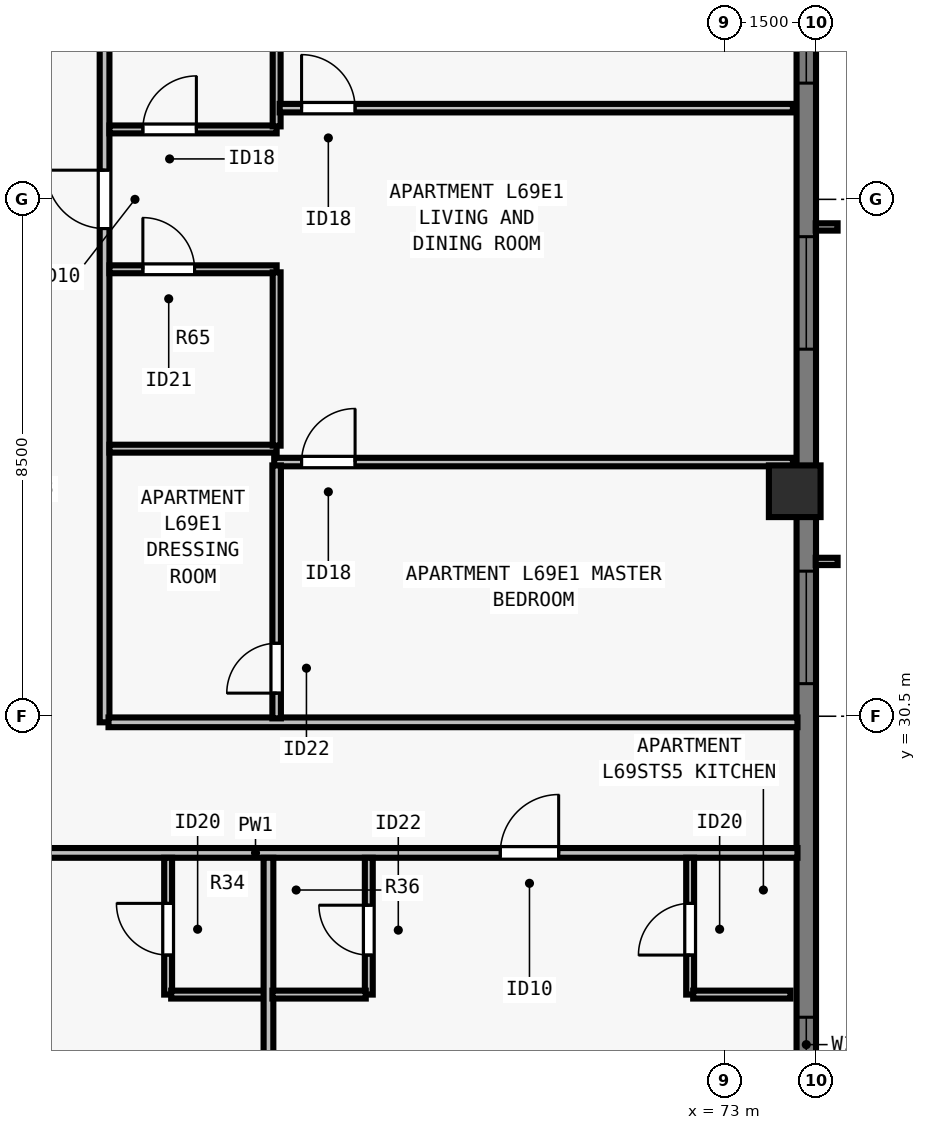
"""IFC4 building model, lengths in metres.
Left out: names, types, materials, properties, quantities, classifications, styles, units other than length and angle.
Written with IfcOpenShell. Run it as: python <this file> out.ifc"""

import sys

from ifc_helpers import new_model, si_unit, direction, frame, frame_2d, origin, origin_2d, place, context, subcontext, project, spatial, rectangle, extrude, element, fill, save


model = new_model("IFC4")
c1 = context("Model", 3, precision=1e-05, world=origin(), true_north=direction((0.0, 1.0)))
c2 = subcontext(c1, "Body", "Model", "MODEL_VIEW")
j1 = project(units=[si_unit("LENGTHUNIT", "METRE"), si_unit("PLANEANGLEUNIT", "RADIAN")], contexts=[c1])
p1 = place(None, origin())
s1 = spatial("IfcSite", under=j1, at=p1, CompositionType="ELEMENT")
p2 = place(p1, origin())
s2 = spatial("IfcBuilding", under=s1, at=p2, CompositionType="ELEMENT")
p3 = place(p2, frame((0.0, 0.0, 251.5)))
s3 = spatial("IfcBuildingStorey", under=s2, at=p3, CompositionType="ELEMENT", Elevation=251.5)
p4 = place(p3, frame((74.15, 34.2, 0.0), z_axis=(0.0, 0.0, 1.0), x_axis=(0.0, 1.0, 0.0)))
e1 = element("IfcColumn", 1, at=p4, inside=s3, PredefinedType="COLUMN", context=c2, shape_type="SweptSolid", body=[
    extrude(rectangle(XDim=0.85, YDim=0.85, at=origin_2d()), origin(), (0.0, 0.0, 1.0), 3.5),
])
p5 = place(p3, frame((74.34, 56.5, 0.0), z_axis=(0.0, 0.0, 1.0), x_axis=(0.0, -1.0, 0.0)))
e2 = element("IfcWall", 2, at=p5, inside=s3, PredefinedType="SOLIDWALL", context=c2, shape_type="SweptSolid", body=[
    extrude(rectangle(XDim=34.702, YDim=0.32, at=frame_2d((17.351, 0.0))), origin(), (0.0, 0.0, 1.0), 3.29),
])
p6 = place(p5, frame((9.388, 0.0, 0.8)))
e3 = element("IfcOpeningElement", 3, at=p6, cuts=e2, PredefinedType="OPENING", context=c2, shape_type="SweptSolid", body=[
    extrude(rectangle(XDim=1.55, YDim=1.678, at=frame_2d((0.775, 0.839))), frame((0.0, 0.17, 0.0), z_axis=(0.0, -1.0, 0.0), x_axis=(1.0, 0.0, 0.0)), (0.0, 0.0, 1.0), 0.34),
])
p7 = place(p5, frame((14.038, 0.0, 0.8)))
e4 = element("IfcOpeningElement", 4, at=p7, cuts=e2, PredefinedType="OPENING", context=c2, shape_type="SweptSolid", body=[
    extrude(rectangle(XDim=1.55, YDim=1.678, at=frame_2d((0.775, 0.839))), frame((0.0, 0.17, 0.0), z_axis=(0.0, -1.0, 0.0), x_axis=(1.0, 0.0, 0.0)), (0.0, 0.0, 1.0), 0.34),
])
p8 = place(p5, frame((18.114, 0.0, 0.8)))
e5 = element("IfcOpeningElement", 5, at=p8, cuts=e2, PredefinedType="OPENING", context=c2, shape_type="SweptSolid", body=[
    extrude(rectangle(XDim=1.85, YDim=1.678, at=frame_2d((0.925, 0.839))), frame((0.0, 0.17, 0.0), z_axis=(0.0, -1.0, 0.0), x_axis=(1.0, 0.0, 0.0)), (0.0, 0.0, 1.0), 0.34),
])
p9 = place(p5, frame((23.614, 0.0, 0.8)))
e6 = element("IfcOpeningElement", 6, at=p9, cuts=e2, PredefinedType="OPENING", context=c2, shape_type="SweptSolid", body=[
    extrude(rectangle(XDim=1.85, YDim=1.678, at=frame_2d((0.925, 0.839))), frame((0.0, 0.17, 0.0), z_axis=(0.0, -1.0, 0.0), x_axis=(1.0, 0.0, 0.0)), (0.0, 0.0, 1.0), 0.34),
])
p10 = place(p5, frame((30.95, 0.0, 0.8)))
e7 = element("IfcOpeningElement", 7, at=p10, cuts=e2, PredefinedType="OPENING", context=c2, shape_type="SweptSolid", body=[
    extrude(rectangle(XDim=0.9, YDim=1.678, at=frame_2d((0.45, 0.839))), frame((0.0, 0.17, 0.0), z_axis=(0.0, -1.0, 0.0), x_axis=(1.0, 0.0, 0.0)), (0.0, 0.0, 1.0), 0.34),
])
p11 = place(p3, frame((29.915, 28.252, 0.0), z_axis=(0.0, 0.0, 1.0), x_axis=(1.0, 0.0, 0.0)))
e8 = element("IfcWall", 8, at=p11, inside=s3, PredefinedType="PARTITIONING", context=c2, shape_type="SweptSolid", body=[
    extrude(rectangle(XDim=44.28, YDim=0.16, at=frame_2d((22.14, 0.0))), origin(), (0.0, 0.0, 1.0), 2.958),
])
p12 = place(p11, frame((5.002, 0.0, 0.0)))
e9 = element("IfcOpeningElement", 9, at=p12, cuts=e8, PredefinedType="OPENING", context=c2, shape_type="SweptSolid", body=[
    extrude(rectangle(XDim=0.96, YDim=2.18, at=frame_2d((0.48, 1.09))), frame((0.0, 0.09, 0.0), z_axis=(0.0, -1.0, 0.0), x_axis=(1.0, 0.0, 0.0)), (0.0, 0.0, 1.0), 0.18),
])
p13 = place(p11, frame((12.718, 0.0, 0.0)))
e10 = element("IfcOpeningElement", 10, at=p13, cuts=e8, PredefinedType="OPENING", context=c2, shape_type="SweptSolid", body=[
    extrude(rectangle(XDim=0.96, YDim=2.18, at=frame_2d((0.48, 1.09))), frame((0.0, 0.09, 0.0), z_axis=(0.0, -1.0, 0.0), x_axis=(1.0, 0.0, 0.0)), (0.0, 0.0, 1.0), 0.18),
])
p14 = place(p11, frame((21.55, 0.0, 0.0)))
e11 = element("IfcOpeningElement", 11, at=p14, cuts=e8, PredefinedType="OPENING", context=c2, shape_type="SweptSolid", body=[
    extrude(rectangle(XDim=0.96, YDim=2.18, at=frame_2d((0.48, 1.09))), frame((0.0, 0.09, 0.0), z_axis=(0.0, -1.0, 0.0), x_axis=(1.0, 0.0, 0.0)), (0.0, 0.0, 1.0), 0.18),
])
p15 = place(p11, frame((30.382, 0.0, 0.0)))
e12 = element("IfcOpeningElement", 12, at=p15, cuts=e8, PredefinedType="OPENING", context=c2, shape_type="SweptSolid", body=[
    extrude(rectangle(XDim=0.96, YDim=2.18, at=frame_2d((0.48, 1.09))), frame((0.0, 0.09, 0.0), z_axis=(0.0, -1.0, 0.0), x_axis=(1.0, 0.0, 0.0)), (0.0, 0.0, 1.0), 0.18),
])
p16 = place(p11, frame((39.393, 0.0, 0.0)))
e13 = element("IfcOpeningElement", 13, at=p16, cuts=e8, PredefinedType="OPENING", context=c2, shape_type="SweptSolid", body=[
    extrude(rectangle(XDim=0.96, YDim=2.18, at=frame_2d((0.48, 1.09))), frame((0.0, 0.09, 0.0), z_axis=(0.0, -1.0, 0.0), x_axis=(1.0, 0.0, 0.0)), (0.0, 0.0, 1.0), 0.18),
])
p17 = place(p3, frame((62.8, 30.4, 0.0), z_axis=(0.0, 0.0, 1.0), x_axis=(0.0, 1.0, 0.0)))
e14 = element("IfcWall", 14, at=p17, inside=s3, PredefinedType="PARTITIONING", context=c2, shape_type="SweptSolid", body=[
    extrude(rectangle(XDim=17.2, YDim=0.16, at=frame_2d((8.6, 0.0))), origin(), (0.0, 0.0, 1.0), 3.29),
])
p18 = place(p17, frame((8.12, 0.0, 0.0)))
e15 = element("IfcOpeningElement", 15, at=p18, cuts=e14, PredefinedType="OPENING", context=c2, shape_type="SweptSolid", body=[
    extrude(rectangle(XDim=0.96, YDim=2.18, at=frame_2d((0.48, 1.09))), frame((0.0, 0.09, 0.0), z_axis=(0.0, -1.0, 0.0), x_axis=(1.0, 0.0, 0.0)), (0.0, 0.0, 1.0), 0.18),
])
p19 = place(p3, frame((62.865, 30.4, 0.0), z_axis=(0.0, 0.0, 1.0), x_axis=(1.0, 0.0, 0.0)))
e16 = element("IfcWall", 16, at=p19, inside=s3, PredefinedType="PARTITIONING", context=c2, shape_type="SweptSolid", body=[
    extrude(rectangle(XDim=11.33, YDim=0.16, at=frame_2d((5.665, 0.0))), origin(), (0.0, 0.0, 1.0), 3.29),
])
p20 = place(p3, frame((63.845, 25.923, 0.0), z_axis=(0.0, 0.0, 1.0), x_axis=(0.0, 1.0, 0.0)))
e17 = element("IfcWall", 17, at=p20, inside=s3, PredefinedType="PLUMBINGWALL", context=c2, shape_type="SweptSolid", body=[
    extrude(rectangle(XDim=2.25, YDim=0.13, at=frame_2d((1.125, 0.0))), origin(), (0.0, 0.0, 1.0), 3.29),
])
p21 = place(p20, frame((0.65, 0.0, 0.0)))
e18 = element("IfcOpeningElement", 18, at=p21, cuts=e17, PredefinedType="OPENING", context=c2, shape_type="SweptSolid", body=[
    extrude(rectangle(XDim=0.85, YDim=2.1, at=frame_2d((0.425, 1.05))), frame((0.0, 0.075, 0.0), z_axis=(0.0, -1.0, 0.0), x_axis=(1.0, 0.0, 0.0)), (0.0, 0.0, 1.0), 0.15),
])
p22 = place(p3, frame((63.896, 25.923, 0.0), z_axis=(0.0, 0.0, 1.0), x_axis=(1.0, 0.0, 0.0)))
e19 = element("IfcWall", 19, at=p22, inside=s3, PredefinedType="PLUMBINGWALL", context=c2, shape_type="SweptSolid", body=[
    extrude(rectangle(XDim=1.6, YDim=0.13, at=frame_2d((0.8, 0.0))), origin(), (0.0, 0.0, 1.0), 3.29),
])
p23 = place(p3, frame((65.496, 16.805, 0.0), z_axis=(0.0, 0.0, 1.0), x_axis=(0.0, 1.0, 0.0)))
e20 = element("IfcWall", 20, at=p23, inside=s3, PredefinedType="PARTITIONING", context=c2, shape_type="SweptSolid", body=[
    extrude(rectangle(XDim=11.368, YDim=0.16, at=frame_2d((5.684, 0.0))), origin(), (0.0, 0.0, 1.0), 2.573),
])
p24 = place(p3, frame((67.146, 25.923, 0.0), z_axis=(0.0, 0.0, 1.0), x_axis=(0.0, 1.0, 0.0)))
e21 = element("IfcWall", 21, at=p24, inside=s3, PredefinedType="PLUMBINGWALL", context=c2, shape_type="SweptSolid", body=[
    extrude(rectangle(XDim=2.25, YDim=0.13, at=frame_2d((1.125, 0.0))), origin(), (0.0, 0.0, 1.0), 3.29),
])
p25 = place(p24, frame((0.65, 0.0, 0.0)))
e22 = element("IfcOpeningElement", 22, at=p25, cuts=e21, PredefinedType="OPENING", context=c2, shape_type="SweptSolid", body=[
    extrude(rectangle(XDim=0.82, YDim=2.1, at=frame_2d((0.41, 1.05))), frame((0.0, 0.075, 0.0), z_axis=(0.0, -1.0, 0.0), x_axis=(1.0, 0.0, 0.0)), (0.0, 0.0, 1.0), 0.15),
])
p26 = place(p3, frame((65.561, 25.923, 0.0), z_axis=(0.0, 0.0, 1.0), x_axis=(1.0, 0.0, 0.0)))
e23 = element("IfcWall", 23, at=p26, inside=s3, PredefinedType="PLUMBINGWALL", context=c2, shape_type="SweptSolid", body=[
    extrude(rectangle(XDim=1.535, YDim=0.13, at=frame_2d((0.768, 0.0))), origin(), (0.0, 0.0, 1.0), 3.29),
])
p27 = place(p3, frame((72.43, 25.923, 0.0), z_axis=(0.0, 0.0, 1.0), x_axis=(0.0, 1.0, 0.0)))
e24 = element("IfcWall", 24, at=p27, inside=s3, PredefinedType="PLUMBINGWALL", context=c2, shape_type="SweptSolid", body=[
    extrude(rectangle(XDim=2.25, YDim=0.13, at=frame_2d((1.125, 0.0))), origin(), (0.0, 0.0, 1.0), 3.29),
])
p28 = place(p27, frame((0.65, 0.0, 0.0)))
e25 = element("IfcOpeningElement", 25, at=p28, cuts=e24, PredefinedType="OPENING", context=c2, shape_type="SweptSolid", body=[
    extrude(rectangle(XDim=0.85, YDim=2.1, at=frame_2d((0.425, 1.05))), frame((0.0, 0.075, 0.0), z_axis=(0.0, -1.0, 0.0), x_axis=(1.0, 0.0, 0.0)), (0.0, 0.0, 1.0), 0.15),
])
p29 = place(p3, frame((72.48, 25.923, 0.0), z_axis=(0.0, 0.0, 1.0), x_axis=(1.0, 0.0, 0.0)))
e26 = element("IfcWall", 26, at=p29, inside=s3, PredefinedType="PLUMBINGWALL", context=c2, shape_type="SweptSolid", body=[
    extrude(rectangle(XDim=1.6, YDim=0.13, at=frame_2d((0.8, 0.0))), origin(), (0.0, 0.0, 1.0), 3.29),
])
p30 = place(p3, frame((62.88, 34.9, 0.0), z_axis=(0.0, 0.0, 1.0), x_axis=(1.0, 0.0, 0.0)))
e27 = element("IfcWall", 27, at=p30, inside=s3, PredefinedType="PLUMBINGWALL", context=c2, shape_type="SweptSolid", body=[
    extrude(rectangle(XDim=2.75, YDim=0.13, at=frame_2d((1.375, 0.0))), origin(), (0.0, 0.0, 1.0), 3.29),
])
p31 = place(p3, frame((62.88, 37.85, 0.0), z_axis=(0.0, 0.0, 1.0), x_axis=(1.0, 0.0, 0.0)))
e28 = element("IfcWall", 28, at=p31, inside=s3, PredefinedType="PLUMBINGWALL", context=c2, shape_type="SweptSolid", body=[
    extrude(rectangle(XDim=2.75, YDim=0.13, at=frame_2d((1.375, 0.0))), origin(), (0.0, 0.0, 1.0), 3.29),
])
p32 = place(p31, frame((0.55, 0.0, 0.0)))
e29 = element("IfcOpeningElement", 29, at=p32, cuts=e28, PredefinedType="OPENING", context=c2, shape_type="SweptSolid", body=[
    extrude(rectangle(XDim=0.85, YDim=2.08, at=frame_2d((0.425, 1.04))), frame((0.0, 0.075, 0.0), z_axis=(0.0, -1.0, 0.0), x_axis=(1.0, 0.0, 0.0)), (0.0, 0.0, 1.0), 0.15),
])
p33 = place(p3, frame((65.63, 34.95, 0.0), z_axis=(0.0, 0.0, 1.0), x_axis=(0.0, 1.0, 0.0)))
e30 = element("IfcWall", 30, at=p33, inside=s3, PredefinedType="PLUMBINGWALL", context=c2, shape_type="SweptSolid", body=[
    extrude(rectangle(XDim=2.85, YDim=0.13, at=frame_2d((1.425, 0.0))), origin(), (0.0, 0.0, 1.0), 3.29),
])
p34 = place(p3, frame((62.88, 40.15, 0.0), z_axis=(0.0, 0.0, 1.0), x_axis=(1.0, 0.0, 0.0)))
e31 = element("IfcWall", 31, at=p34, inside=s3, PredefinedType="PLUMBINGWALL", context=c2, shape_type="SweptSolid", body=[
    extrude(rectangle(XDim=2.75, YDim=0.13, at=frame_2d((1.375, 0.0))), origin(), (0.0, 0.0, 1.0), 3.29),
])
p35 = place(p34, frame((0.55, 0.0, 0.0)))
e32 = element("IfcOpeningElement", 32, at=p35, cuts=e31, PredefinedType="OPENING", context=c2, shape_type="SweptSolid", body=[
    extrude(rectangle(XDim=0.88, YDim=2.1, at=frame_2d((0.44, 1.05))), frame((0.0, 0.075, 0.0), z_axis=(0.0, -1.0, 0.0), x_axis=(1.0, 0.0, 0.0)), (0.0, 0.0, 1.0), 0.15),
])
p36 = place(p3, frame((65.63, 40.2, 0.0), z_axis=(0.0, 0.0, 1.0), x_axis=(0.0, 1.0, 0.0)))
e33 = element("IfcWall", 33, at=p36, inside=s3, PredefinedType="PLUMBINGWALL", context=c2, shape_type="SweptSolid", body=[
    extrude(rectangle(XDim=3.15, YDim=0.13, at=frame_2d((1.575, 0.0))), origin(), (0.0, 0.0, 1.0), 3.29),
])
p37 = place(p3, frame((65.59, 34.68, 0.0), z_axis=(0.0, 0.0, 1.0), x_axis=(1.0, 0.0, 0.0)))
e34 = element("IfcWall", 34, at=p37, inside=s3, PredefinedType="PARTITIONING", context=c2, shape_type="SweptSolid", body=[
    extrude(rectangle(XDim=8.53, YDim=0.14, at=frame_2d((4.265, 0.0))), origin(), (0.0, 0.0, 1.0), 3.29),
])
p38 = place(p37, frame((0.45, 0.0, 0.0)))
e35 = element("IfcOpeningElement", 35, at=p38, cuts=e34, PredefinedType="OPENING", context=c2, shape_type="SweptSolid", body=[
    extrude(rectangle(XDim=0.88, YDim=2.1, at=frame_2d((0.44, 1.05))), frame((0.0, 0.08, 0.0), z_axis=(0.0, -1.0, 0.0), x_axis=(1.0, 0.0, 0.0)), (0.0, 0.0, 1.0), 0.16),
])
p39 = place(p3, frame((65.63, 30.465, 0.0), z_axis=(0.0, 0.0, 1.0), x_axis=(0.0, 1.0, 0.0)))
e36 = element("IfcWall", 36, at=p39, inside=s3, PredefinedType="PARTITIONING", context=c2, shape_type="SweptSolid", body=[
    extrude(rectangle(XDim=4.16, YDim=0.14, at=frame_2d((2.08, 0.0))), origin(), (0.0, 0.0, 1.0), 3.29),
])
p40 = place(p39, frame((0.415, 0.0, 0.0)))
e37 = element("IfcOpeningElement", 37, at=p40, cuts=e36, PredefinedType="OPENING", context=c2, shape_type="SweptSolid", body=[
    extrude(rectangle(XDim=0.82, YDim=2.1, at=frame_2d((0.41, 1.05))), frame((0.0, 0.08, 0.0), z_axis=(0.0, -1.0, 0.0), x_axis=(1.0, 0.0, 0.0)), (0.0, 0.0, 1.0), 0.16),
])
p41 = place(p3, frame((65.68, 40.5, 0.0), z_axis=(0.0, 0.0, 1.0), x_axis=(1.0, 0.0, 0.0)))
e38 = element("IfcWall", 38, at=p41, inside=s3, PredefinedType="PARTITIONING", context=c2, shape_type="SweptSolid", body=[
    extrude(rectangle(XDim=8.44, YDim=0.14, at=frame_2d((4.22, 0.0))), origin(), (0.0, 0.0, 1.0), 3.29),
])
p42 = place(p41, frame((0.36, 0.0, 0.0)))
e39 = element("IfcOpeningElement", 39, at=p42, cuts=e38, PredefinedType="OPENING", context=c2, shape_type="SweptSolid", body=[
    extrude(rectangle(XDim=0.88, YDim=2.1, at=frame_2d((0.44, 1.05))), frame((0.0, 0.08, 0.0), z_axis=(0.0, -1.0, 0.0), x_axis=(1.0, 0.0, 0.0)), (0.0, 0.0, 1.0), 0.16),
])
p43 = place(p7, origin())
e40 = element("IfcWindow", 40, at=p43, inside=s3, PartitioningType="SINGLE_PANEL", PredefinedType="WINDOW", context=c2, shape_type="SweptSolid", body=[
    extrude(rectangle(XDim=1.55, YDim=1.678, at=frame_2d((0.775, 0.839))), frame((0.0, -0.05, 0.0), z_axis=(0.0, -1.0, 0.0), x_axis=(1.0, 0.0, 0.0)), (0.0, 0.0, 1.0), 0.06),
])
fill(e4, e40)
p44 = place(p8, origin())
e41 = element("IfcWindow", 41, at=p44, inside=s3, PartitioningType="SINGLE_PANEL", PredefinedType="WINDOW", context=c2, shape_type="SweptSolid", body=[
    extrude(rectangle(XDim=1.85, YDim=1.678, at=frame_2d((0.925, 0.839))), frame((0.0, -0.05, 0.0), z_axis=(0.0, -1.0, 0.0), x_axis=(1.0, 0.0, 0.0)), (0.0, 0.0, 1.0), 0.06),
])
fill(e5, e41)
p45 = place(p9, origin())
e42 = element("IfcWindow", 42, at=p45, inside=s3, PartitioningType="SINGLE_PANEL", PredefinedType="WINDOW", context=c2, shape_type="SweptSolid", body=[
    extrude(rectangle(XDim=1.85, YDim=1.678, at=frame_2d((0.925, 0.839))), frame((0.0, -0.05, 0.0), z_axis=(0.0, -1.0, 0.0), x_axis=(1.0, 0.0, 0.0)), (0.0, 0.0, 1.0), 0.06),
])
fill(e6, e42)
p46 = place(p10, origin())
e43 = element("IfcWindow", 43, at=p46, inside=s3, PartitioningType="SINGLE_PANEL", PredefinedType="WINDOW", context=c2, shape_type="SweptSolid", body=[
    extrude(rectangle(XDim=0.9, YDim=1.678, at=frame_2d((0.45, 0.839))), frame((0.0, -0.04, 0.0), z_axis=(0.0, -1.0, 0.0), x_axis=(1.0, 0.0, 0.0)), (0.0, 0.0, 1.0), 0.06),
])
fill(e7, e43)
p47 = place(p21, origin())
e44 = element("IfcDoor", 44, at=p47, inside=s3, OperationType="SINGLE_SWING_RIGHT", PredefinedType="DOOR", context=c2, shape_type="SweptSolid", body=[
    extrude(rectangle(XDim=0.85, YDim=2.1, at=frame_2d((0.425, 1.05))), frame((0.0, 0.025, 0.0), z_axis=(0.0, -1.0, 0.0), x_axis=(1.0, 0.0, 0.0)), (0.0, 0.0, 1.0), 0.05),
])
fill(e18, e44)
p48 = place(p25, origin())
e45 = element("IfcDoor", 45, at=p48, inside=s3, OperationType="SINGLE_SWING_RIGHT", PredefinedType="DOOR", context=c2, shape_type="SweptSolid", body=[
    extrude(rectangle(XDim=0.82, YDim=2.1, at=frame_2d((0.41, 1.05))), frame((0.0, 0.025, 0.0), z_axis=(0.0, -1.0, 0.0), x_axis=(1.0, 0.0, 0.0)), (0.0, 0.0, 1.0), 0.05),
])
fill(e22, e45)
p49 = place(p28, origin())
e46 = element("IfcDoor", 46, at=p49, inside=s3, OperationType="SINGLE_SWING_LEFT", PredefinedType="DOOR", context=c2, shape_type="SweptSolid", body=[
    extrude(rectangle(XDim=0.85, YDim=2.1, at=frame_2d((0.425, 1.05))), frame((0.0, 0.025, 0.0), z_axis=(0.0, -1.0, 0.0), x_axis=(1.0, 0.0, 0.0)), (0.0, 0.0, 1.0), 0.05),
])
fill(e25, e46)
p50 = place(p16, origin())
e47 = element("IfcDoor", 47, at=p50, inside=s3, OperationType="SINGLE_SWING_RIGHT", PredefinedType="DOOR", context=c2, shape_type="SweptSolid", body=[
    extrude(rectangle(XDim=0.96, YDim=2.18, at=frame_2d((0.48, 1.09))), frame((0.0, 0.025, 0.0), z_axis=(0.0, -1.0, 0.0), x_axis=(1.0, 0.0, 0.0)), (0.0, 0.0, 1.0), 0.05),
])
fill(e13, e47)
p51 = place(p32, origin())
e48 = element("IfcDoor", 48, at=p51, inside=s3, OperationType="SINGLE_SWING_LEFT", PredefinedType="DOOR", context=c2, shape_type="SweptSolid", body=[
    extrude(rectangle(XDim=0.85, YDim=2.08, at=frame_2d((0.425, 1.04))), frame((0.0, 0.025, 0.0), z_axis=(0.0, -1.0, 0.0), x_axis=(1.0, 0.0, 0.0)), (0.0, 0.0, 1.0), 0.05),
])
fill(e29, e48)
p52 = place(p35, origin())
e49 = element("IfcDoor", 49, at=p52, inside=s3, OperationType="SINGLE_SWING_RIGHT", PredefinedType="DOOR", context=c2, shape_type="SweptSolid", body=[
    extrude(rectangle(XDim=0.88, YDim=2.1, at=frame_2d((0.44, 1.05))), frame((0.0, 0.025, 0.0), z_axis=(0.0, -1.0, 0.0), x_axis=(1.0, 0.0, 0.0)), (0.0, 0.0, 1.0), 0.05),
])
fill(e32, e49)
p53 = place(p40, origin())
e50 = element("IfcDoor", 50, at=p53, inside=s3, OperationType="SINGLE_SWING_LEFT", PredefinedType="DOOR", context=c2, shape_type="SweptSolid", body=[
    extrude(rectangle(XDim=0.82, YDim=2.1, at=frame_2d((0.41, 1.05))), frame((0.0, 0.025, 0.0), z_axis=(0.0, -1.0, 0.0), x_axis=(1.0, 0.0, 0.0)), (0.0, 0.0, 1.0), 0.05),
])
fill(e37, e50)
p54 = place(p38, origin())
e51 = element("IfcDoor", 51, at=p54, inside=s3, OperationType="SINGLE_SWING_RIGHT", PredefinedType="DOOR", context=c2, shape_type="SweptSolid", body=[
    extrude(rectangle(XDim=0.88, YDim=2.1, at=frame_2d((0.44, 1.05))), frame((0.0, 0.025, 0.0), z_axis=(0.0, -1.0, 0.0), x_axis=(1.0, 0.0, 0.0)), (0.0, 0.0, 1.0), 0.05),
])
fill(e35, e51)
p55 = place(p42, origin())
e52 = element("IfcDoor", 52, at=p55, inside=s3, OperationType="SINGLE_SWING_LEFT", PredefinedType="DOOR", context=c2, shape_type="SweptSolid", body=[
    extrude(rectangle(XDim=0.88, YDim=2.1, at=frame_2d((0.44, 1.05))), frame((0.0, 0.025, 0.0), z_axis=(0.0, -1.0, 0.0), x_axis=(1.0, 0.0, 0.0)), (0.0, 0.0, 1.0), 0.05),
])
fill(e39, e52)
p56 = place(p18, origin())
e53 = element("IfcDoor", 53, at=p56, inside=s3, OperationType="SINGLE_SWING_RIGHT", PredefinedType="DOOR", context=c2, shape_type="SweptSolid", body=[
    extrude(rectangle(XDim=0.96, YDim=2.18, at=frame_2d((0.48, 1.09))), frame((0.0, 0.025, 0.0), z_axis=(0.0, -1.0, 0.0), x_axis=(1.0, 0.0, 0.0)), (0.0, 0.0, 1.0), 0.05),
])
fill(e15, e53)
save(model, sys.argv[1])
